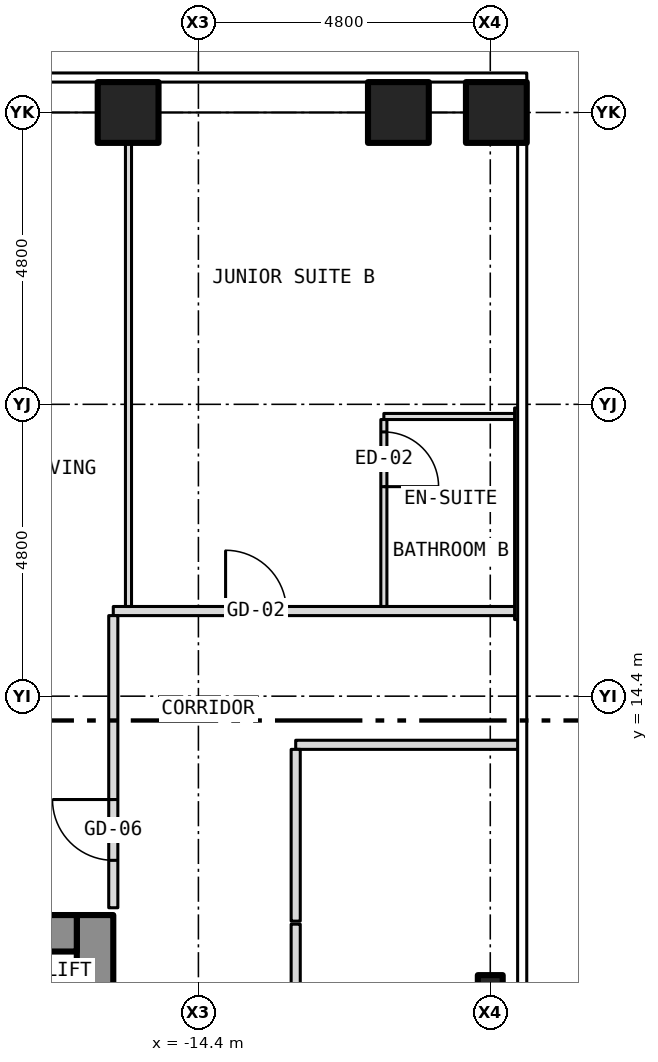
"""IFC4 building model, lengths in metres.
Left out: names, types, materials, properties, quantities, classifications, styles, units other than length and angle.
Written with IfcOpenShell. Run it as: python <this file> out.ifc"""

import sys

from ifc_helpers import new_model, si_unit, direction, frame, frame_2d, origin, origin_2d, place, context, subcontext, project, spatial, rectangle, hollow_rectangle, i_section, extrude, element, fill, save


model = new_model("IFC4")
c1 = context("Model", 3, precision=1e-05, world=origin(), true_north=direction((0.0, 1.0)))
c2 = subcontext(c1, "Body", "Model", "MODEL_VIEW")
j1 = project(units=[si_unit("LENGTHUNIT", "METRE"), si_unit("PLANEANGLEUNIT", "RADIAN")], contexts=[c1])
p1 = place(None, origin())
s1 = spatial("IfcSite", under=j1, at=p1, CompositionType="ELEMENT")
p2 = place(p1, origin())
s2 = spatial("IfcBuilding", under=s1, at=p2, CompositionType="ELEMENT")
p3 = place(p2, frame((0.0, 0.0, 67.0)))
s3 = spatial("IfcBuildingStorey", under=s2, at=p3, CompositionType="ELEMENT", Elevation=67.0)
for number, where, z_axis, x_axis in (
    (1, (-15.556, 24.0, -0.15), (0.0, 0.0, 1.0), (1.0, 0.0, 0.0)),
    (2, (-11.111, 24.0, -0.15), (0.0, 0.0, 1.0), (1.0, 0.0, 0.0)),
    (3, (-9.5, 24.0, -0.15), (0.0, 0.0, 1.0), (1.0, 0.0, 0.0)),
):
    element("IfcColumn", number, at=place(p3, frame(where, z_axis=z_axis, x_axis=x_axis)), inside=s3, PredefinedType="COLUMN", context=c2, shape_type="SweptSolid", body=[
        extrude(hollow_rectangle(XDim=1.0, YDim=1.0, WallThickness=0.06, at=origin_2d()), origin(), (0.0, 0.0, 1.0), 3.5),
    ])
p4 = place(p3, frame((-9.6, 9.6, -0.15), z_axis=(0.0, 0.0, 1.0), x_axis=(1.0, 0.0, 0.0)))
e4 = element("IfcColumn", 4, at=p4, inside=s3, PredefinedType="COLUMN", context=c2, shape_type="SweptSolid", body=[
    extrude(i_section(OverallWidth=0.409, OverallDepth=0.424, WebThickness=0.033, FlangeThickness=0.052, at=origin_2d()), origin(), (0.0, 0.0, 1.0), 3.5),
])
p5 = place(p3, frame((-16.1, -10.8, 0.0), z_axis=(0.0, 0.0, 1.0), x_axis=(0.0, 1.0, 0.0)))
e5 = element("IfcWall", 5, at=p5, inside=s3, PredefinedType="SHEAR", context=c2, shape_type="SweptSolid", body=[
    extrude(rectangle(XDim=21.6, YDim=0.6, at=frame_2d((10.8, 0.0))), origin(), (0.0, 0.0, 1.0), 3.25),
])
p6 = place(p5, frame((9.4, 0.0, 0.0)))
e6 = element("IfcOpeningElement", 6, at=p6, cuts=e5, PredefinedType="OPENING", context=c2, shape_type="SweptSolid", body=[
    extrude(rectangle(XDim=1.1, YDim=2.1, at=frame_2d((0.55, 1.05))), frame((0.0, 0.312, 0.0), z_axis=(0.0, -1.0, 0.0), x_axis=(1.0, 0.0, 0.0)), (0.0, 0.0, 1.0), 0.624),
])
p7 = place(p5, frame((11.5, 0.0, 0.0)))
e7 = element("IfcOpeningElement", 7, at=p7, cuts=e5, PredefinedType="OPENING", context=c2, shape_type="SweptSolid", body=[
    extrude(rectangle(XDim=1.1, YDim=2.1, at=frame_2d((0.55, 1.05))), frame((0.0, 0.312, 0.0), z_axis=(0.0, -1.0, 0.0), x_axis=(1.0, 0.0, 0.0)), (0.0, 0.0, 1.0), 0.624),
])
p8 = place(p5, frame((13.6, 0.0, 0.0)))
e8 = element("IfcOpeningElement", 8, at=p8, cuts=e5, PredefinedType="OPENING", context=c2, shape_type="SweptSolid", body=[
    extrude(rectangle(XDim=1.1, YDim=2.1, at=frame_2d((0.55, 1.05))), frame((0.0, 0.312, 0.0), z_axis=(0.0, -1.0, 0.0), x_axis=(1.0, 0.0, 0.0)), (0.0, 0.0, 1.0), 0.624),
])
p9 = place(p5, frame((15.7, 0.0, 0.0)))
e9 = element("IfcOpeningElement", 9, at=p9, cuts=e5, PredefinedType="OPENING", context=c2, shape_type="SweptSolid", body=[
    extrude(rectangle(XDim=1.1, YDim=2.1, at=frame_2d((0.55, 1.05))), frame((0.0, 0.312, 0.0), z_axis=(0.0, -1.0, 0.0), x_axis=(1.0, 0.0, 0.0)), (0.0, 0.0, 1.0), 0.624),
])
p10 = place(p5, frame((17.8, 0.0, 0.0)))
e10 = element("IfcOpeningElement", 10, at=p10, cuts=e5, PredefinedType="OPENING", context=c2, shape_type="SweptSolid", body=[
    extrude(rectangle(XDim=1.1, YDim=2.1, at=frame_2d((0.55, 1.05))), frame((0.0, 0.312, 0.0), z_axis=(0.0, -1.0, 0.0), x_axis=(1.0, 0.0, 0.0)), (0.0, 0.0, 1.0), 0.624),
])
p11 = place(p5, frame((0.758, 0.0, 0.0)))
e11 = element("IfcOpeningElement", 11, at=p11, cuts=e5, PredefinedType="OPENING", context=c2, shape_type="SweptSolid", body=[
    extrude(rectangle(XDim=1.1, YDim=2.1, at=frame_2d((0.55, 1.05))), frame((0.0, 0.312, 0.0), z_axis=(0.0, -1.0, 0.0), x_axis=(1.0, 0.0, 0.0)), (0.0, 0.0, 1.0), 0.624),
])
p12 = place(p5, frame((7.5, 0.0, 0.0)))
e12 = element("IfcOpeningElement", 12, at=p12, cuts=e5, PredefinedType="OPENING", context=c2, shape_type="SweptSolid", body=[
    extrude(rectangle(XDim=1.1, YDim=2.1, at=frame_2d((0.55, 1.05))), frame((0.0, 0.312, 0.0), z_axis=(0.0, -1.0, 0.0), x_axis=(1.0, 0.0, 0.0)), (0.0, 0.0, 1.0), 0.624),
])
p13 = place(p3, frame((-23.4, 10.5, 0.0), z_axis=(0.0, 0.0, 1.0), x_axis=(1.0, 0.0, 0.0)))
e13 = element("IfcWall", 13, at=p13, inside=s3, PredefinedType="SHEAR", context=c2, shape_type="SweptSolid", body=[
    extrude(rectangle(XDim=7.0, YDim=0.6, at=frame_2d((3.5, 0.0))), origin(), (0.0, 0.0, 1.0), 3.25),
])
p14 = place(p3, frame((-12.8, 13.6, 0.0), z_axis=(0.0, 0.0, 1.0), x_axis=(1.0, 0.0, 0.0)))
e14 = element("IfcWall", 14, at=p14, inside=s3, PredefinedType="PARTITIONING", context=c2, shape_type="SweptSolid", body=[
    extrude(rectangle(XDim=3.68, YDim=0.15, at=frame_2d((1.84, 0.0))), origin(), (0.0, 0.0, 1.0), 3.35),
])
p15 = place(p3, frame((-15.8, 15.8, 0.0), z_axis=(0.0, 0.0, 1.0), x_axis=(1.0, 0.0, 0.0)))
e15 = element("IfcWall", 15, at=p15, inside=s3, PredefinedType="PARTITIONING", context=c2, shape_type="SweptSolid", body=[
    extrude(rectangle(XDim=6.65, YDim=0.15, at=frame_2d((3.325, 0.0))), origin(), (0.0, 0.0, 1.0), 3.35),
])
p16 = place(p15, frame((1.847, 0.0, 0.0)))
e16 = element("IfcOpeningElement", 16, at=p16, cuts=e15, PredefinedType="OPENING", context=c2, shape_type="SweptSolid", body=[
    extrude(rectangle(XDim=1.0, YDim=2.1, at=frame_2d((0.5, 1.05))), frame((0.0, 0.087, 0.0), z_axis=(0.0, -1.0, 0.0), x_axis=(1.0, 0.0, 0.0)), (0.0, 0.0, 1.0), 0.174),
])
p17 = place(p3, frame((-11.35, 19.0, 0.0), z_axis=(0.0, 0.0, 1.0), x_axis=(1.0, 0.0, 0.0)))
e17 = element("IfcWall", 17, at=p17, inside=s3, PredefinedType="PARTITIONING", context=c2, shape_type="SweptSolid", body=[
    extrude(rectangle(XDim=2.2, YDim=0.1, at=frame_2d((1.1, 0.0))), origin(), (0.0, 0.0, 1.0), 3.35),
])
p18 = place(p3, frame((-15.8, 10.92, 0.0), z_axis=(0.0, 0.0, 1.0), x_axis=(0.0, 1.0, 0.0)))
e18 = element("IfcWall", 18, at=p18, inside=s3, PredefinedType="PARTITIONING", context=c2, shape_type="SweptSolid", body=[
    extrude(rectangle(XDim=4.805, YDim=0.15, at=frame_2d((2.403, 0.0))), origin(), (0.0, 0.0, 1.0), 3.35),
])
p19 = place(p18, frame((0.78, 0.0, 0.0)))
e19 = element("IfcOpeningElement", 19, at=p19, cuts=e18, PredefinedType="OPENING", context=c2, shape_type="SweptSolid", body=[
    extrude(rectangle(XDim=1.0, YDim=2.1, at=frame_2d((0.5, 1.05))), frame((0.0, 0.087, 0.0), z_axis=(0.0, -1.0, 0.0), x_axis=(1.0, 0.0, 0.0)), (0.0, 0.0, 1.0), 0.174),
])
p20 = place(p3, frame((-15.55, 15.875, 0.0), z_axis=(0.0, 0.0, 1.0), x_axis=(0.0, 1.0, 0.0)))
e20 = element("IfcWall", 20, at=p20, inside=s3, PredefinedType="PARTITIONING", context=c2, shape_type="SweptSolid", body=[
    extrude(rectangle(XDim=8.005, YDim=0.1, at=frame_2d((4.002, 0.0))), origin(), (0.0, 0.0, 1.0), 3.35),
])
p21 = place(p3, frame((-12.8, 3.375, 0.0), z_axis=(0.0, 0.0, 1.0), x_axis=(0.0, 1.0, 0.0)))
e21 = element("IfcWall", 21, at=p21, inside=s3, PredefinedType="PARTITIONING", context=c2, shape_type="SweptSolid", body=[
    extrude(rectangle(XDim=7.275, YDim=0.15, at=frame_2d((3.637, 0.0))), origin(), (0.0, 0.0, 1.0), 3.35),
])
p22 = place(p21, frame((3.175, 0.0, 0.0)))
e22 = element("IfcOpeningElement", 22, at=p22, cuts=e21, PredefinedType="OPENING", context=c2, shape_type="SweptSolid", body=[
    extrude(rectangle(XDim=0.9, YDim=2.1, at=frame_2d((0.45, 1.05))), frame((0.0, 0.087, 0.0), z_axis=(0.0, -1.0, 0.0), x_axis=(1.0, 0.0, 0.0)), (0.0, 0.0, 1.0), 0.174),
])
p23 = place(p3, frame((-12.8, 10.7, 0.0), z_axis=(0.0, 0.0, 1.0), x_axis=(0.0, 1.0, 0.0)))
e23 = element("IfcWall", 23, at=p23, inside=s3, PredefinedType="PARTITIONING", context=c2, shape_type="SweptSolid", body=[
    extrude(rectangle(XDim=2.825, YDim=0.15, at=frame_2d((1.413, 0.0))), origin(), (0.0, 0.0, 1.0), 3.35),
])
p24 = place(p3, frame((-11.35, 15.875, 0.0), z_axis=(0.0, 0.0, 1.0), x_axis=(0.0, 1.0, 0.0)))
e24 = element("IfcWall", 24, at=p24, inside=s3, PredefinedType="PARTITIONING", context=c2, shape_type="SweptSolid", body=[
    extrude(rectangle(XDim=3.075, YDim=0.1, at=frame_2d((1.538, 0.0))), origin(), (0.0, 0.0, 1.0), 3.35),
])
p25 = place(p24, frame((1.971, 0.0, 0.0)))
e25 = element("IfcOpeningElement", 25, at=p25, cuts=e24, PredefinedType="OPENING", context=c2, shape_type="SweptSolid", body=[
    extrude(rectangle(XDim=0.9, YDim=2.1, at=frame_2d((0.45, 1.05))), frame((0.0, 0.062, 0.0), z_axis=(0.0, -1.0, 0.0), x_axis=(1.0, 0.0, 0.0)), (0.0, 0.0, 1.0), 0.124),
])
p26 = place(p3, frame((-9.15, 15.66, 0.0), z_axis=(0.0, 0.0, 1.0), x_axis=(0.0, 1.0, 0.0)))
e26 = element("IfcWall", 26, at=p26, inside=s3, PredefinedType="PARTITIONING", context=c2, shape_type="SweptSolid", body=[
    extrude(rectangle(XDim=3.48, YDim=0.1, at=frame_2d((1.74, 0.0))), origin(), (0.0, 0.0, 1.0), 2.733),
])
p27 = place(p16, origin())
e27 = element("IfcDoor", 27, at=p27, inside=s3, OperationType="SINGLE_SWING_LEFT", PredefinedType="DOOR", context=c2, shape_type="SweptSolid", body=[
    extrude(rectangle(XDim=1.0, YDim=2.1, at=frame_2d((0.5, 1.05))), frame((0.0, 0.025, 0.0), z_axis=(0.0, -1.0, 0.0), x_axis=(1.0, 0.0, 0.0)), (0.0, 0.0, 1.0), 0.05),
])
fill(e16, e27)
p28 = place(p25, origin())
e28 = element("IfcDoor", 28, at=p28, inside=s3, OperationType="SINGLE_SWING_LEFT", PredefinedType="DOOR", context=c2, shape_type="SweptSolid", body=[
    extrude(rectangle(XDim=0.9, YDim=2.1, at=frame_2d((0.45, 1.05))), frame((0.0, 0.025, 0.0), z_axis=(0.0, -1.0, 0.0), x_axis=(1.0, 0.0, 0.0)), (0.0, 0.0, 1.0), 0.05),
])
fill(e25, e28)
p29 = place(p19, origin())
e29 = element("IfcDoor", 29, at=p29, inside=s3, OperationType="SINGLE_SWING_RIGHT", PredefinedType="DOOR", context=c2, shape_type="SweptSolid", body=[
    extrude(rectangle(XDim=1.0, YDim=2.1, at=frame_2d((0.5, 1.05))), frame((0.0, 0.025, 0.0), z_axis=(0.0, -1.0, 0.0), x_axis=(1.0, 0.0, 0.0)), (0.0, 0.0, 1.0), 0.05),
])
fill(e19, e29)
save(model, sys.argv[1])
